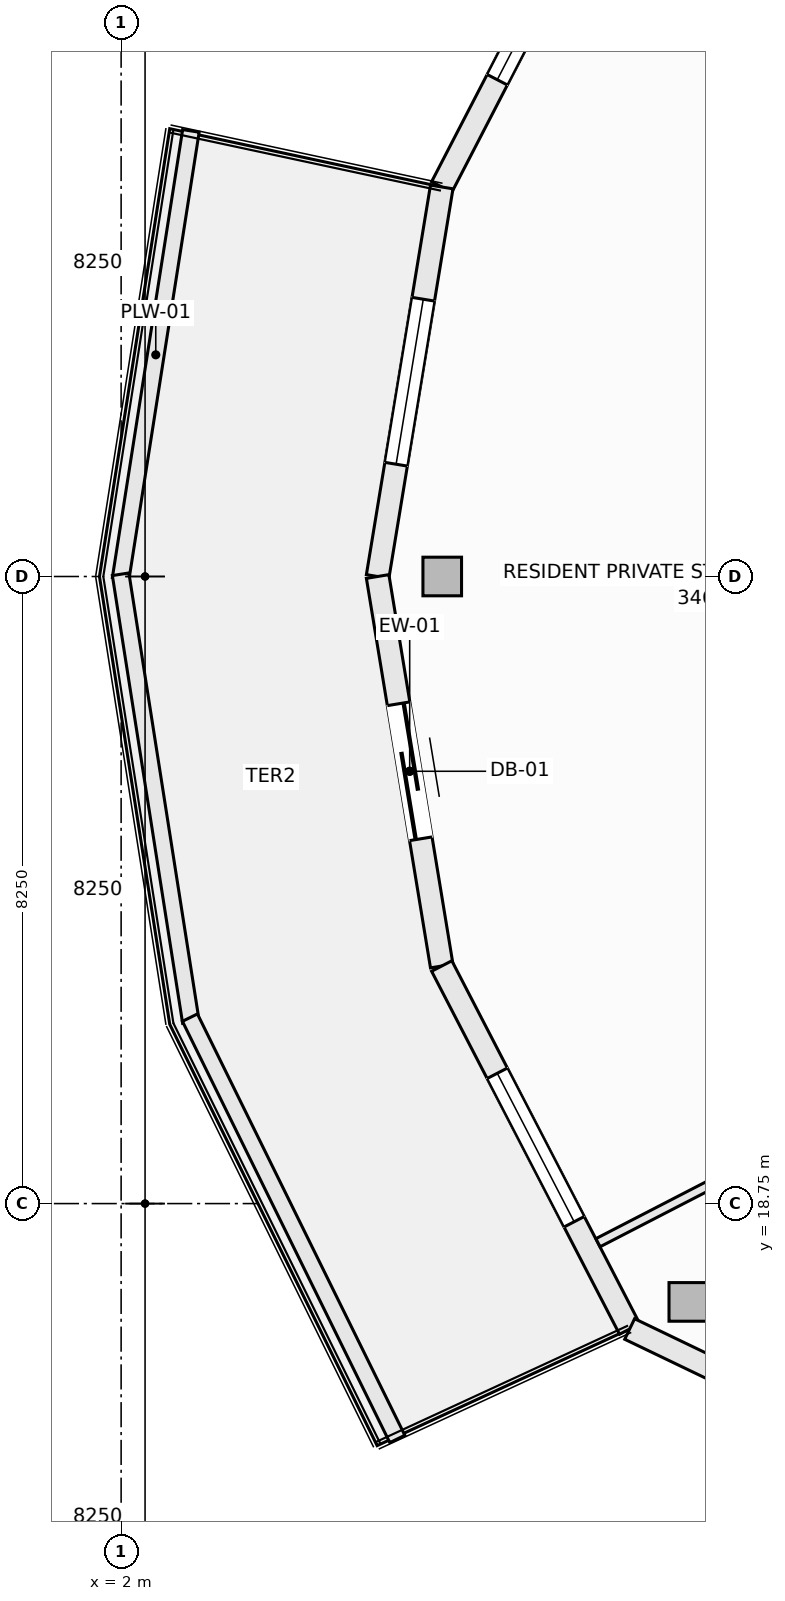
"""IFC4 building model, lengths in metres.
Left out: names, types, materials, properties, quantities, classifications, styles, units other than length and angle.
Written with IfcOpenShell. Run it as: python <this file> out.ifc"""

import sys

from ifc_helpers import new_model, si_unit, direction, frame, frame_2d, origin, origin_2d, place, context, subcontext, project, spatial, rectangle, hollow_rectangle, extrude, element, fill, save


model = new_model("IFC4")
c1 = context("Model", 3, precision=1e-05, world=origin(), true_north=direction((0.0, 1.0)))
c2 = subcontext(c1, "Body", "Model", "MODEL_VIEW")
j1 = project(units=[si_unit("LENGTHUNIT", "METRE"), si_unit("PLANEANGLEUNIT", "RADIAN")], contexts=[c1])
p1 = place(None, origin())
s1 = spatial("IfcSite", under=j1, at=p1, CompositionType="ELEMENT")
p2 = place(p1, origin())
s2 = spatial("IfcBuilding", under=s1, at=p2, CompositionType="ELEMENT")
p3 = place(p2, frame((0.0, 0.0, 216.2)))
s3 = spatial("IfcBuildingStorey", under=s2, at=p3, CompositionType="ELEMENT", Elevation=216.2)
for number, where, z_axis, x_axis in (
    (1, (6.225, 27.0, -0.27), (0.0, 0.0, 1.0), (1.0, 0.0, 0.0)),
    (2, (9.463, 17.456, -0.27), (0.0, 0.0, 1.0), (1.0, 0.0, 0.0)),
):
    element("IfcColumn", number, at=place(p3, frame(where, z_axis=z_axis, x_axis=x_axis)), inside=s3, PredefinedType="COLUMN", context=c2, shape_type="SweptSolid", body=[
        extrude(hollow_rectangle(XDim=0.508, YDim=0.508, WallThickness=0.019, at=origin_2d()), origin(), (0.0, 0.0, 1.0), 3.3),
    ])
p4 = place(p3, frame((6.218, 32.125, 0.0), z_axis=(0.0, 0.0, 1.0), x_axis=(0.459808219482, 0.888018243786, 0.0)))
e3 = element("IfcWall", 3, at=p4, inside=s3, PredefinedType="SOLIDWALL", context=c2, shape_type="SweptSolid", body=[
    extrude(rectangle(XDim=5.378, YDim=0.3, at=frame_2d((2.689, 0.0))), origin(), (0.0, 0.0, 1.0), 2.605),
])
p5 = place(p4, frame((1.589, 0.0, 0.72)))
e4 = element("IfcOpeningElement", 4, at=p5, cuts=e3, PredefinedType="OPENING", context=c2, shape_type="SweptSolid", body=[
    extrude(rectangle(XDim=2.2, YDim=1.65, at=frame_2d((1.1, 0.825))), frame((0.0, 0.16, 0.0), z_axis=(0.0, -1.0, 0.0), x_axis=(1.0, 0.0, 0.0)), (0.0, 0.0, 1.0), 0.32),
])
p6 = place(p3, frame((5.375, 27.0, 0.0), z_axis=(0.0, 0.0, 1.0), x_axis=(0.16237087798, 0.986729799886, 0.0)))
e5 = element("IfcWall", 5, at=p6, inside=s3, PredefinedType="SOLIDWALL", context=c2, shape_type="SweptSolid", body=[
    extrude(rectangle(XDim=5.193, YDim=0.3, at=frame_2d((2.597, 0.0))), origin(), (0.0, 0.0, 1.0), 2.605),
])
p7 = place(p6, frame((1.497, 0.0, 0.72)))
e6 = element("IfcOpeningElement", 6, at=p7, cuts=e5, PredefinedType="OPENING", context=c2, shape_type="SweptSolid", body=[
    extrude(rectangle(XDim=2.2, YDim=1.65, at=frame_2d((1.1, 0.825))), frame((0.0, 0.16, 0.0), z_axis=(0.0, -1.0, 0.0), x_axis=(1.0, 0.0, 0.0)), (0.0, 0.0, 1.0), 0.32),
])
p8 = place(p3, frame((5.375, 27.0, 0.0), z_axis=(0.0, 0.0, 1.0), x_axis=(0.16237087798, -0.986729799886, 0.0)))
e7 = element("IfcWall", 7, at=p8, inside=s3, PredefinedType="SOLIDWALL", context=c2, shape_type="SweptSolid", body=[
    extrude(rectangle(XDim=5.193, YDim=0.3, at=frame_2d((2.597, 0.0))), origin(), (0.0, 0.0, 1.0), 2.605),
])
p9 = place(p8, frame((1.697, 0.0, 0.0)))
e8 = element("IfcOpeningElement", 8, at=p9, cuts=e7, PredefinedType="OPENING", context=c2, shape_type="SweptSolid", body=[
    extrude(rectangle(XDim=1.8, YDim=2.25, at=frame_2d((0.9, 1.125))), frame((0.0, 0.16, 0.0), z_axis=(0.0, -1.0, 0.0), x_axis=(1.0, 0.0, 0.0)), (0.0, 0.0, 1.0), 0.32),
])
p10 = place(p3, frame((6.218, 21.875, 0.0), z_axis=(0.0, 0.0, 1.0), x_axis=(0.459808219482, -0.888018243786, 0.0)))
e9 = element("IfcWall", 9, at=p10, inside=s3, PredefinedType="SOLIDWALL", context=c2, shape_type="SweptSolid", body=[
    extrude(rectangle(XDim=5.378, YDim=0.3, at=frame_2d((2.689, 0.0))), origin(), (0.0, 0.0, 1.0), 2.605),
])
p11 = place(p10, frame((1.589, 0.0, 0.72)))
e10 = element("IfcOpeningElement", 10, at=p11, cuts=e9, PredefinedType="OPENING", context=c2, shape_type="SweptSolid", body=[
    extrude(rectangle(XDim=2.2, YDim=1.65, at=frame_2d((1.1, 0.825))), frame((0.0, 0.16, 0.0), z_axis=(0.0, -1.0, 0.0), x_axis=(1.0, 0.0, 0.0)), (0.0, 0.0, 1.0), 0.32),
])
p12 = place(p3, frame((8.691, 17.1, 0.0), z_axis=(0.0, 0.0, 1.0), x_axis=(0.901348331142, -0.433094892545, 0.0)))
e11 = element("IfcWall", 11, at=p12, inside=s3, PredefinedType="SOLIDWALL", context=c2, shape_type="SweptSolid", body=[
    extrude(rectangle(XDim=6.021, YDim=0.3, at=frame_2d((3.01, 0.0))), origin(), (0.0, 0.0, 1.0), 2.605),
])
p13 = place(p12, frame((1.91, 0.0, 0.72)))
e12 = element("IfcOpeningElement", 12, at=p13, cuts=e11, PredefinedType="OPENING", context=c2, shape_type="SweptSolid", body=[
    extrude(rectangle(XDim=2.2, YDim=1.65, at=frame_2d((1.1, 0.825))), frame((0.0, 0.16, 0.0), z_axis=(0.0, -1.0, 0.0), x_axis=(1.0, 0.0, 0.0)), (0.0, 0.0, 1.0), 0.32),
])
for number, where, z_axis, x_axis in (
    (13, (1.993, 26.971, 0.0), (0.0, 0.0, 1.0), (0.155, 0.988, 0.0)),
    (14, (1.993, 27.029, 0.0), (0.0, 0.0, 1.0), (0.155, -0.988, 0.0)),
):
    element("IfcWall", number, at=place(p3, frame(where, z_axis=z_axis, x_axis=x_axis)), inside=s3, PredefinedType="PARAPET", context=c2, shape_type="SweptSolid", body=[
        extrude(rectangle(XDim=5.964, YDim=0.22, at=frame_2d((2.982, 0.0))), origin(), (0.0, 0.0, 1.0), 0.52),
    ])
p14 = place(p3, frame((2.906, 21.196, 0.0), z_axis=(0.0, 0.0, 1.0), x_axis=(0.441640961804, -0.897191875162, 0.0)))
e15 = element("IfcWall", 15, at=p14, inside=s3, PredefinedType="PARAPET", context=c2, shape_type="SweptSolid", body=[
    extrude(rectangle(XDim=6.178, YDim=0.22, at=frame_2d((3.089, 0.0))), origin(), (0.0, 0.0, 1.0), 0.52),
])
p15 = place(p3, frame((8.274, 18.235, 0.0), z_axis=(0.0, 0.0, 1.0), x_axis=(0.888553888563, 0.458772260625, 0.0)))
e16 = element("IfcWall", 16, at=p15, inside=s3, PredefinedType="PARTITIONING", context=c2, shape_type="SweptSolid", body=[
    extrude(rectangle(XDim=6.779, YDim=0.12, at=frame_2d((3.39, 0.0))), origin(), (0.0, 0.0, 1.0), 3.03),
])
p16 = place(p5, origin())
e17 = element("IfcWindow", 17, at=p16, inside=s3, PartitioningType="SINGLE_PANEL", PredefinedType="WINDOW", context=c2, shape_type="SweptSolid", body=[
    extrude(rectangle(XDim=2.2, YDim=1.65, at=frame_2d((1.1, 0.825))), frame((0.0, 0.03, 0.0), z_axis=(0.0, -1.0, 0.0), x_axis=(1.0, 0.0, 0.0)), (0.0, 0.0, 1.0), 0.06),
])
fill(e4, e17)
p17 = place(p7, origin())
e18 = element("IfcWindow", 18, at=p17, inside=s3, PartitioningType="SINGLE_PANEL", PredefinedType="WINDOW", context=c2, shape_type="SweptSolid", body=[
    extrude(rectangle(XDim=2.2, YDim=1.65, at=frame_2d((1.1, 0.825))), frame((0.0, 0.03, 0.0), z_axis=(0.0, -1.0, 0.0), x_axis=(1.0, 0.0, 0.0)), (0.0, 0.0, 1.0), 0.06),
])
fill(e6, e18)
p18 = place(p9, frame((1.8, 0.0, 0.0), z_axis=(0.0, 0.0, 1.0), x_axis=(-1.0, 0.0, 0.0)))
e19 = element("IfcDoor", 19, at=p18, inside=s3, OperationType="SLIDING_TO_LEFT", PredefinedType="DOOR", context=c2, shape_type="SweptSolid", body=[
    extrude(rectangle(XDim=1.8, YDim=2.25, at=frame_2d((0.9, 1.125))), frame((0.0, 0.025, 0.0), z_axis=(0.0, -1.0, 0.0), x_axis=(1.0, 0.0, 0.0)), (0.0, 0.0, 1.0), 0.05),
])
fill(e8, e19)
p19 = place(p11, origin())
e20 = element("IfcWindow", 20, at=p19, inside=s3, PartitioningType="SINGLE_PANEL", PredefinedType="WINDOW", context=c2, shape_type="SweptSolid", body=[
    extrude(rectangle(XDim=2.2, YDim=1.65, at=frame_2d((1.1, 0.825))), frame((0.0, 0.03, 0.0), z_axis=(0.0, -1.0, 0.0), x_axis=(1.0, 0.0, 0.0)), (0.0, 0.0, 1.0), 0.06),
])
fill(e10, e20)
save(model, sys.argv[1])
